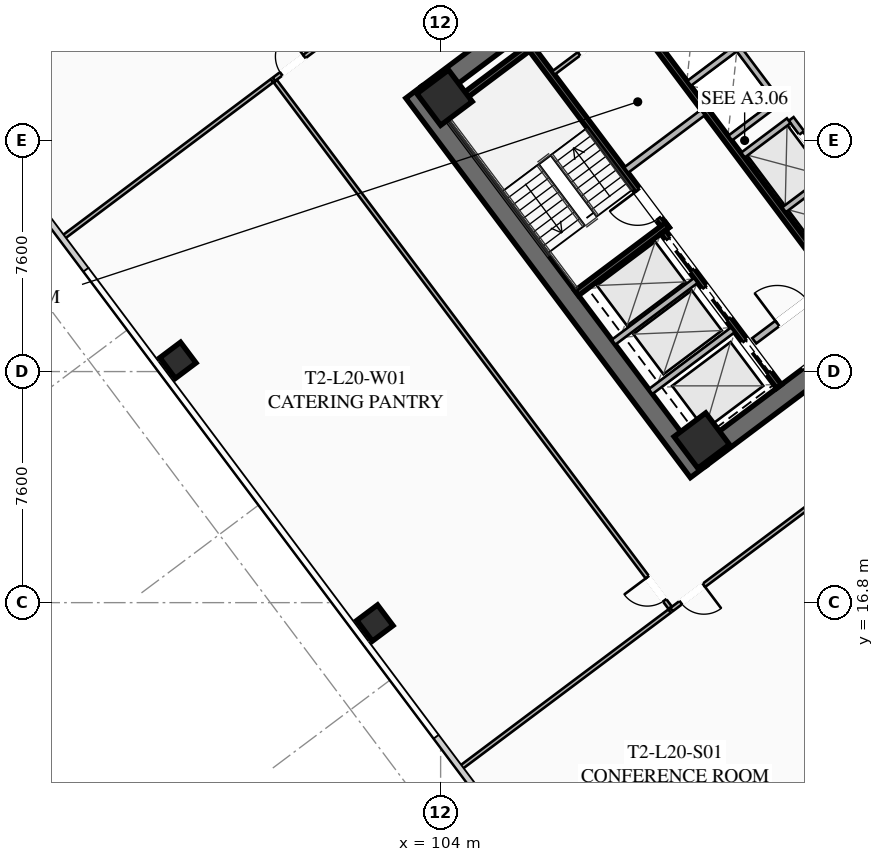
"""IFC4 building model, lengths in metres.
Left out: names, types, materials, properties, quantities, classifications, styles, units other than length and angle.
Written with IfcOpenShell. Run it as: python <this file> out.ifc"""

import sys

from ifc_helpers import new_model, si_unit, direction, frame, frame_2d, origin, origin_2d, place, context, subcontext, project, spatial, rectangle, hollow_rectangle, extrude, element, fill, save


model = new_model("IFC4")
c1 = context("Model", 3, precision=1e-05, world=origin(), true_north=direction((0.0, 1.0)))
c2 = subcontext(c1, "Body", "Model", "MODEL_VIEW")
j1 = project(units=[si_unit("LENGTHUNIT", "METRE"), si_unit("PLANEANGLEUNIT", "RADIAN")], contexts=[c1])
p1 = place(None, origin())
s1 = spatial("IfcSite", under=j1, at=p1, CompositionType="ELEMENT")
p2 = place(p1, origin())
s2 = spatial("IfcBuilding", under=s1, at=p2, CompositionType="ELEMENT")
p3 = place(p2, frame((0.0, 0.0, 77.85)))
s3 = spatial("IfcBuildingStorey", under=s2, at=p3, CompositionType="ELEMENT", Elevation=77.85)
for number, where, z_axis, x_axis in (
    (1, (112.476, 21.107, 0.0), (0.0, 0.0, 1.0), (-0.6, 0.8, 0.0)),
    (2, (115.524, 42.893, 0.0), (0.0, 0.0, 1.0), (0.6, -0.8, 0.0)),
):
    element("IfcWall", number, at=place(p3, frame(where, z_axis=z_axis, x_axis=x_axis)), inside=s3, PredefinedType="SHEAR", context=c2, shape_type="SweptSolid", body=[
        extrude(rectangle(XDim=15.6, YDim=0.65, at=frame_2d((7.8, 0.0))), origin(), (0.0, 0.0, 1.0), 3.55),
    ])
p4 = place(p3, frame((124.429, 30.478, 0.0), z_axis=(0.0, 0.0, 1.0), x_axis=(-0.799998028465, -0.600002628705, 0.0)))
e3 = element("IfcWall", 3, at=p4, inside=s3, PredefinedType="SHEAR", context=c2, shape_type="SweptSolid", body=[
    extrude(rectangle(XDim=14.86, YDim=0.65, at=frame_2d((7.43, 0.0))), origin(), (0.0, 0.0, 1.0), 3.55),
])
p5 = place(p4, frame((9.13, 0.0, 0.0)))
e4 = element("IfcOpeningElement", 4, at=p5, cuts=e3, PredefinedType="OPENING", context=c2, shape_type="SweptSolid", body=[
    extrude(rectangle(XDim=1.25, YDim=2.25, at=frame_2d((0.625, 1.125))), frame((0.0, 0.335, 0.0), z_axis=(0.0, -1.0, 0.0), x_axis=(1.0, 0.0, 0.0)), (0.0, 0.0, 1.0), 0.67),
])
p6 = place(p4, frame((4.08, 0.0, 0.0)))
e5 = element("IfcOpeningElement", 5, at=p6, cuts=e3, PredefinedType="OPENING", context=c2, shape_type="SweptSolid", body=[
    extrude(rectangle(XDim=1.25, YDim=2.25, at=frame_2d((0.625, 1.125))), frame((0.0, 0.335, 0.0), z_axis=(0.0, -1.0, 0.0), x_axis=(1.0, 0.0, 0.0)), (0.0, 0.0, 1.0), 0.67),
])
p7 = place(p3, frame((103.571, 33.522, 0.0), z_axis=(0.0, 0.0, 1.0), x_axis=(0.799998028465, 0.600002628705, 0.0)))
e6 = element("IfcWall", 6, at=p7, inside=s3, PredefinedType="SHEAR", context=c2, shape_type="SweptSolid", body=[
    extrude(rectangle(XDim=14.86, YDim=0.65, at=frame_2d((7.43, 0.0))), origin(), (0.0, 0.0, 1.0), 3.55),
])
p8 = place(p7, frame((4.48, 0.0, 0.0)))
e7 = element("IfcOpeningElement", 7, at=p8, cuts=e6, PredefinedType="OPENING", context=c2, shape_type="SweptSolid", body=[
    extrude(rectangle(XDim=1.25, YDim=2.25, at=frame_2d((0.625, 1.125))), frame((0.0, 0.335, 0.0), z_axis=(0.0, -1.0, 0.0), x_axis=(1.0, 0.0, 0.0)), (0.0, 0.0, 1.0), 0.67),
])
p9 = place(p7, frame((9.53, 0.0, 0.0)))
e8 = element("IfcOpeningElement", 8, at=p9, cuts=e6, PredefinedType="OPENING", context=c2, shape_type="SweptSolid", body=[
    extrude(rectangle(XDim=1.25, YDim=2.25, at=frame_2d((0.625, 1.125))), frame((0.0, 0.335, 0.0), z_axis=(0.0, -1.0, 0.0), x_axis=(1.0, 0.0, 0.0)), (0.0, 0.0, 1.0), 0.67),
])
for number, where, z_axis, x_axis in (
    (9, (112.59, 22.13, 0.0), (0.0, 0.0, 1.0), (0.8, 0.6, 0.0)),
    (10, (104.13, 33.41, 0.0), (0.0, 0.0, 1.0), (0.8, 0.6, 0.0)),
):
    element("IfcColumn", number, at=place(p3, frame(where, z_axis=z_axis, x_axis=x_axis)), inside=s3, PredefinedType="COLUMN", context=c2, shape_type="SweptSolid", body=[
        extrude(hollow_rectangle(XDim=1.3, YDim=1.3, WallThickness=0.05, at=origin_2d()), origin(), (0.0, 0.0, 1.0), 3.35),
    ])
for number, where, z_axis, x_axis in (
    (11, (95.36, 24.77, 0.0), (0.0, 0.0, 1.0), (0.8, 0.6, 0.0)),
    (12, (101.84, 16.13, 0.0), (0.0, 0.0, 1.0), (0.8, 0.6, 0.0)),
):
    element("IfcColumn", number, at=place(p3, frame(where, z_axis=z_axis, x_axis=x_axis)), inside=s3, PredefinedType="COLUMN", context=c2, shape_type="SweptSolid", body=[
        extrude(hollow_rectangle(XDim=0.85, YDim=0.85, WallThickness=0.035, at=origin_2d()), origin(), (0.0, 0.0, 1.0), 3.35),
    ])
p10 = place(p3, frame((111.44, 29.08, 0.0), z_axis=(0.0, 0.0, 1.0), x_axis=(-0.600009827119, 0.799992629566, 0.0)))
e13 = element("IfcWall", 13, at=p10, inside=s3, PredefinedType="SHEAR", context=c2, shape_type="SweptSolid", body=[
    extrude(rectangle(XDim=7.95, YDim=0.2, at=frame_2d((3.975, 0.0))), origin(), (0.0, 0.0, 1.0), 3.35),
])
p11 = place(p10, frame((0.45, 0.0, 0.0)))
e14 = element("IfcOpeningElement", 14, at=p11, cuts=e13, PredefinedType="OPENING", context=c2, shape_type="SweptSolid", body=[
    extrude(rectangle(XDim=1.15, YDim=2.2, at=frame_2d((0.575, 1.1))), frame((0.0, 0.11, 0.0), z_axis=(0.0, -1.0, 0.0), x_axis=(1.0, 0.0, 0.0)), (0.0, 0.0, 1.0), 0.22),
])
for number, where, z_axis, x_axis in (
    (15, (108.476, 26.982, 0.0), (0.0, 0.0, 1.0), (0.8, 0.6, 0.0)),
    (16, (104.036, 32.902, 0.0), (0.0, 0.0, 1.0), (0.8, 0.6, 0.0)),
):
    element("IfcWall", number, at=place(p3, frame(where, z_axis=z_axis, x_axis=x_axis)), inside=s3, PredefinedType="SHEAR", context=c2, shape_type="SweptSolid", body=[
        extrude(rectangle(XDim=3.73, YDim=0.2, at=frame_2d((1.865, 0.0))), origin(), (0.0, 0.0, 1.0), 3.35),
    ])
p12 = place(p3, frame((117.938, 26.016, 0.0), z_axis=(0.0, 0.0, 1.0), x_axis=(-0.600005463273, 0.799995902516, 0.0)))
e17 = element("IfcWall", 17, at=p12, inside=s3, PredefinedType="SHEAR", context=c2, shape_type="SweptSolid", body=[
    extrude(rectangle(XDim=14.3, YDim=0.2, at=frame_2d((7.15, 0.0))), origin(), (0.0, 0.0, 1.0), 3.35),
])
p13 = place(p3, frame((110.104, 31.028, 0.0), z_axis=(0.0, 0.0, 1.0), x_axis=(0.800018601094, 0.59997519774, 0.0)))
e18 = element("IfcWall", 18, at=p13, inside=s3, PredefinedType="SOLIDWALL", context=c2, shape_type="SweptSolid", body=[
    extrude(rectangle(XDim=3.15, YDim=0.22, at=frame_2d((1.575, 0.0))), origin(), (0.0, 0.0, 1.0), 2.703),
])
p14 = place(p3, frame((114.316, 25.412, 0.0), z_axis=(0.0, 0.0, 1.0), x_axis=(0.800018601094, 0.59997519774, 0.0)))
e19 = element("IfcWall", 19, at=p14, inside=s3, PredefinedType="SOLIDWALL", context=c2, shape_type="SweptSolid", body=[
    extrude(rectangle(XDim=3.15, YDim=0.22, at=frame_2d((1.575, 0.0))), origin(), (0.0, 0.0, 1.0), 2.703),
])
p15 = place(p14, frame((0.95, 0.0, 0.0)))
e20 = element("IfcOpeningElement", 20, at=p15, cuts=e19, PredefinedType="OPENING", context=c2, shape_type="SweptSolid", body=[
    extrude(rectangle(XDim=1.25, YDim=2.25, at=frame_2d((0.625, 1.125))), frame((0.0, 0.12, 0.0), z_axis=(0.0, -1.0, 0.0), x_axis=(1.0, 0.0, 0.0)), (0.0, 0.0, 1.0), 0.24),
])
p16 = place(p3, frame((115.13, 23.91, 0.0), z_axis=(0.0, 0.0, 1.0), x_axis=(-0.599975393228, 0.800018454488, 0.0)))
e21 = element("IfcWall", 21, at=p16, inside=s3, PredefinedType="SHEAR", context=c2, shape_type="SweptSolid", body=[
    extrude(rectangle(XDim=6.35, YDim=0.2, at=frame_2d((3.175, 0.0))), origin(), (0.0, 0.0, 1.0), 3.35),
])
p17 = place(p16, frame((4.775, 0.0, 0.0)))
e22 = element("IfcOpeningElement", 22, at=p17, cuts=e21, PredefinedType="OPENING", context=c2, shape_type="SweptSolid", body=[
    extrude(rectangle(XDim=1.3, YDim=2.25, at=frame_2d((0.65, 1.125))), frame((0.0, 0.11, 0.0), z_axis=(0.0, -1.0, 0.0), x_axis=(1.0, 0.0, 0.0)), (0.0, 0.0, 1.0), 0.22),
])
p18 = place(p16, frame((2.775, 0.0, 0.0)))
e23 = element("IfcOpeningElement", 23, at=p18, cuts=e21, PredefinedType="OPENING", context=c2, shape_type="SweptSolid", body=[
    extrude(rectangle(XDim=1.3, YDim=2.25, at=frame_2d((0.65, 1.125))), frame((0.0, 0.11, 0.0), z_axis=(0.0, -1.0, 0.0), x_axis=(1.0, 0.0, 0.0)), (0.0, 0.0, 1.0), 0.22),
])
p19 = place(p16, frame((0.575, 0.0, 0.0)))
e24 = element("IfcOpeningElement", 24, at=p19, cuts=e21, PredefinedType="OPENING", context=c2, shape_type="SweptSolid", body=[
    extrude(rectangle(XDim=1.3, YDim=2.25, at=frame_2d((0.65, 1.125))), frame((0.0, 0.11, 0.0), z_axis=(0.0, -1.0, 0.0), x_axis=(1.0, 0.0, 0.0)), (0.0, 0.0, 1.0), 0.22),
])
for number, where, z_axis, x_axis in (
    (25, (110.906, 23.742, 0.0), (0.0, 0.0, 1.0), (0.8, 0.6, 0.0)),
    (26, (109.688, 25.366, 0.0), (0.0, 0.0, 1.0), (0.8, 0.6, 0.0)),
):
    element("IfcWall", number, at=place(p3, frame(where, z_axis=z_axis, x_axis=x_axis)), inside=s3, PredefinedType="SOLIDWALL", context=c2, shape_type="SweptSolid", body=[
        extrude(rectangle(XDim=3.38, YDim=0.2, at=frame_2d((1.69, 0.0))), origin(), (0.0, 0.0, 1.0), 3.35),
    ])
p20 = place(p3, frame((107.71, 34.22, 0.0), z_axis=(0.0, 0.0, 1.0), x_axis=(0.799981399002, 0.60002480053, 0.0)))
e27 = element("IfcWall", 27, at=p20, inside=s3, PredefinedType="PARTITIONING", context=c2, shape_type="SweptSolid", body=[
    extrude(rectangle(XDim=3.15, YDim=0.135, at=frame_2d((1.575, 0.0))), origin(), (0.0, 0.0, 1.0), 2.703),
])
p21 = place(p20, frame((1.05, 0.0, 0.0)))
e28 = element("IfcOpeningElement", 28, at=p21, cuts=e27, PredefinedType="OPENING", context=c2, shape_type="SweptSolid", body=[
    extrude(rectangle(XDim=1.05, YDim=2.2, at=frame_2d((0.525, 1.1))), frame((0.0, 0.077, 0.0), z_axis=(0.0, -1.0, 0.0), x_axis=(1.0, 0.0, 0.0)), (0.0, 0.0, 1.0), 0.155),
])
p22 = place(p3, frame((119.61, 27.27, 0.0), z_axis=(0.0, 0.0, 1.0), x_axis=(-0.600011488909, 0.79999138319, 0.0)))
e29 = element("IfcWall", 29, at=p22, inside=s3, PredefinedType="SOLIDWALL", context=c2, shape_type="SweptSolid", body=[
    extrude(rectangle(XDim=6.8, YDim=0.2, at=frame_2d((3.4, 0.0))), origin(), (0.0, 0.0, 1.0), 3.35),
])
p23 = place(p22, frame((0.625, 0.0, 0.0)))
e30 = element("IfcOpeningElement", 30, at=p23, cuts=e29, PredefinedType="OPENING", context=c2, shape_type="SweptSolid", body=[
    extrude(rectangle(XDim=1.1, YDim=2.2, at=frame_2d((0.55, 1.1))), frame((0.0, 0.11, 0.0), z_axis=(0.0, -1.0, 0.0), x_axis=(1.0, 0.0, 0.0)), (0.0, 0.0, 1.0), 0.22),
])
p24 = place(p22, frame((2.875, 0.0, 0.0)))
e31 = element("IfcOpeningElement", 31, at=p24, cuts=e29, PredefinedType="OPENING", context=c2, shape_type="SweptSolid", body=[
    extrude(rectangle(XDim=1.1, YDim=2.2, at=frame_2d((0.55, 1.1))), frame((0.0, 0.11, 0.0), z_axis=(0.0, -1.0, 0.0), x_axis=(1.0, 0.0, 0.0)), (0.0, 0.0, 1.0), 0.22),
])
p25 = place(p22, frame((5.125, 0.0, 0.0)))
e32 = element("IfcOpeningElement", 32, at=p25, cuts=e29, PredefinedType="OPENING", context=c2, shape_type="SweptSolid", body=[
    extrude(rectangle(XDim=1.1, YDim=2.2, at=frame_2d((0.55, 1.1))), frame((0.0, 0.11, 0.0), z_axis=(0.0, -1.0, 0.0), x_axis=(1.0, 0.0, 0.0)), (0.0, 0.0, 1.0), 0.22),
])
p26 = place(p3, frame((115.296, 29.722, 0.0), z_axis=(0.0, 0.0, 1.0), x_axis=(0.799984418148, 0.600020775241, 0.0)))
e33 = element("IfcWall", 33, at=p26, inside=s3, PredefinedType="SOLIDWALL", context=c2, shape_type="SweptSolid", body=[
    extrude(rectangle(XDim=1.88, YDim=0.2, at=frame_2d((0.94, 0.0))), origin(), (0.0, 0.0, 1.0), 3.35),
])
p27 = place(p3, frame((113.946, 31.522, 0.0), z_axis=(0.0, 0.0, 1.0), x_axis=(0.8, 0.6, 0.0)))
e34 = element("IfcWall", 34, at=p27, inside=s3, PredefinedType="SOLIDWALL", context=c2, shape_type="SweptSolid", body=[
    extrude(rectangle(XDim=1.88, YDim=0.2, at=frame_2d((0.94, 0.0))), origin(), (0.0, 0.0, 1.0), 3.35),
])
p28 = place(p3, frame((115.11, 33.27, 0.0), z_axis=(0.0, 0.0, 1.0), x_axis=(-0.600011488909, 0.79999138319, 0.0)))
e35 = element("IfcWall", 35, at=p28, inside=s3, PredefinedType="SOLIDWALL", context=c2, shape_type="SweptSolid", body=[
    extrude(rectangle(XDim=6.8, YDim=0.2, at=frame_2d((3.4, 0.0))), origin(), (0.0, 0.0, 1.0), 3.35),
])
p29 = place(p3, frame((113.526, 32.082, 0.0), z_axis=(0.0, 0.0, 1.0), x_axis=(0.800046745961, 0.599937666993, 0.0)))
e36 = element("IfcWall", 36, at=p29, inside=s3, PredefinedType="SOLIDWALL", context=c2, shape_type="SweptSolid", body=[
    extrude(rectangle(XDim=1.88, YDim=0.2, at=frame_2d((0.94, 0.0))), origin(), (0.0, 0.0, 1.0), 3.35),
])
p30 = place(p3, frame((112.176, 33.882, 0.0), z_axis=(0.0, 0.0, 1.0), x_axis=(0.8, 0.6, 0.0)))
e37 = element("IfcWall", 37, at=p30, inside=s3, PredefinedType="SOLIDWALL", context=c2, shape_type="SweptSolid", body=[
    extrude(rectangle(XDim=1.88, YDim=0.2, at=frame_2d((0.94, 0.0))), origin(), (0.0, 0.0, 1.0), 3.35),
])
p31 = place(p3, frame((98.516, 34.012, 0.0), z_axis=(0.0, 0.0, 1.0), x_axis=(0.8, 0.6, 0.0)))
e38 = element("IfcWall", 38, at=p31, inside=s3, PredefinedType="PARTITIONING", context=c2, shape_type="SweptSolid", body=[
    extrude(rectangle(XDim=28.23, YDim=0.135, at=frame_2d((14.115, 0.0))), origin(), (0.0, 0.0, 1.0), 2.703),
])
p32 = place(p31, frame((0.3, 0.0, 0.0)))
e39 = element("IfcOpeningElement", 39, at=p32, cuts=e38, PredefinedType="OPENING", context=c2, shape_type="SweptSolid", body=[
    extrude(rectangle(XDim=0.95, YDim=2.05, at=frame_2d((0.475, 1.025))), frame((0.0, 0.077, 0.0), z_axis=(0.0, -1.0, 0.0), x_axis=(1.0, 0.0, 0.0)), (0.0, 0.0, 1.0), 0.155),
])
p33 = place(p31, frame((11.004, 0.0, 0.0)))
e40 = element("IfcOpeningElement", 40, at=p33, cuts=e38, PredefinedType="OPENING", context=c2, shape_type="SweptSolid", body=[
    extrude(rectangle(XDim=0.95, YDim=2.05, at=frame_2d((0.475, 1.025))), frame((0.0, 0.077, 0.0), z_axis=(0.0, -1.0, 0.0), x_axis=(1.0, 0.0, 0.0)), (0.0, 0.0, 1.0), 0.155),
])
p34 = place(p31, frame((26.98, 0.0, 0.0)))
e41 = element("IfcOpeningElement", 41, at=p34, cuts=e38, PredefinedType="OPENING", context=c2, shape_type="SweptSolid", body=[
    extrude(rectangle(XDim=0.95, YDim=2.05, at=frame_2d((0.475, 1.025))), frame((0.0, 0.077, 0.0), z_axis=(0.0, -1.0, 0.0), x_axis=(1.0, 0.0, 0.0)), (0.0, 0.0, 1.0), 0.155),
])
p35 = place(p3, frame((134.18, 33.51, 0.0), z_axis=(0.0, 0.0, 1.0), x_axis=(-0.8, -0.6, 0.0)))
e42 = element("IfcWall", 42, at=p35, inside=s3, PredefinedType="PARTITIONING", context=c2, shape_type="SweptSolid", body=[
    extrude(rectangle(XDim=28.23, YDim=0.135, at=frame_2d((14.115, 0.0))), origin(), (0.0, 0.0, 1.0), 2.703),
])
p36 = place(p35, frame((26.9, 0.0, 0.0)))
e43 = element("IfcOpeningElement", 43, at=p36, cuts=e42, PredefinedType="OPENING", context=c2, shape_type="SweptSolid", body=[
    extrude(rectangle(XDim=0.95, YDim=2.05, at=frame_2d((0.475, 1.025))), frame((0.0, 0.077, 0.0), z_axis=(0.0, -1.0, 0.0), x_axis=(1.0, 0.0, 0.0)), (0.0, 0.0, 1.0), 0.155),
])
p37 = place(p35, frame((16.453, 0.0, 0.0)))
e44 = element("IfcOpeningElement", 44, at=p37, cuts=e42, PredefinedType="OPENING", context=c2, shape_type="SweptSolid", body=[
    extrude(rectangle(XDim=0.95, YDim=2.05, at=frame_2d((0.475, 1.025))), frame((0.0, 0.077, 0.0), z_axis=(0.0, -1.0, 0.0), x_axis=(1.0, 0.0, 0.0)), (0.0, 0.0, 1.0), 0.155),
])
p38 = place(p35, frame((0.38, 0.0, 0.0)))
e45 = element("IfcOpeningElement", 45, at=p38, cuts=e42, PredefinedType="OPENING", context=c2, shape_type="SweptSolid", body=[
    extrude(rectangle(XDim=0.95, YDim=2.05, at=frame_2d((0.475, 1.025))), frame((0.0, 0.077, 0.0), z_axis=(0.0, -1.0, 0.0), x_axis=(1.0, 0.0, 0.0)), (0.0, 0.0, 1.0), 0.155),
])
p39 = place(p3, frame((111.548, 16.636, 0.0), z_axis=(0.0, 0.0, 1.0), x_axis=(-0.600003610192, 0.799997292343, 0.0)))
e46 = element("IfcWall", 46, at=p39, inside=s3, PredefinedType="PARTITIONING", context=c2, shape_type="SweptSolid", body=[
    extrude(rectangle(XDim=21.64, YDim=0.135, at=frame_2d((10.82, 0.0))), origin(), (0.0, 0.0, 1.0), 2.703),
])
p40 = place(p39, frame((0.3, 0.0, 0.0)))
e47 = element("IfcOpeningElement", 47, at=p40, cuts=e46, PredefinedType="OPENING", context=c2, shape_type="SweptSolid", body=[
    extrude(rectangle(XDim=0.95, YDim=2.05, at=frame_2d((0.475, 1.025))), frame((0.0, 0.077, 0.0), z_axis=(0.0, -1.0, 0.0), x_axis=(1.0, 0.0, 0.0)), (0.0, 0.0, 1.0), 0.155),
])
p41 = place(p3, frame((98.452, 33.964, 0.0), z_axis=(0.0, 0.0, 1.0), x_axis=(-0.799993202584, -0.600009063115, 0.0)))
e48 = element("IfcWall", 48, at=p41, inside=s3, PredefinedType="PARTITIONING", context=c2, shape_type="SweptSolid", body=[
    extrude(rectangle(XDim=8.62, YDim=0.135, at=frame_2d((4.31, 0.0))), origin(), (0.0, 0.0, 1.0), 2.703),
])
p42 = place(p3, frame((104.636, 11.352, 0.0), z_axis=(0.0, 0.0, 1.0), x_axis=(0.800006797429, 0.599990936654, 0.0)))
e49 = element("IfcWall", 49, at=p42, inside=s3, PredefinedType="PARTITIONING", context=c2, shape_type="SweptSolid", body=[
    extrude(rectangle(XDim=8.62, YDim=0.135, at=frame_2d((4.31, 0.0))), origin(), (0.0, 0.0, 1.0), 2.703),
])
p43 = place(p11, origin())
e50 = element("IfcDoor", 50, at=p43, inside=s3, OperationType="SINGLE_SWING_RIGHT", PredefinedType="DOOR", context=c2, shape_type="SweptSolid", body=[
    extrude(rectangle(XDim=1.15, YDim=2.2, at=frame_2d((0.575, 1.1))), frame((0.0, 0.025, 0.0), z_axis=(0.0, -1.0, 0.0), x_axis=(1.0, 0.0, 0.0)), (0.0, 0.0, 1.0), 0.05),
])
fill(e14, e50)
p44 = place(p15, origin())
e51 = element("IfcDoor", 51, at=p44, inside=s3, OperationType="SINGLE_SWING_LEFT", PredefinedType="DOOR", context=c2, shape_type="SweptSolid", body=[
    extrude(rectangle(XDim=1.25, YDim=2.25, at=frame_2d((0.625, 1.125))), frame((0.0, 0.025, 0.0), z_axis=(0.0, -1.0, 0.0), x_axis=(1.0, 0.0, 0.0)), (0.0, 0.0, 1.0), 0.05),
])
fill(e20, e51)
p45 = place(p21, origin())
e52 = element("IfcDoor", 52, at=p45, inside=s3, OperationType="SINGLE_SWING_LEFT", PredefinedType="DOOR", context=c2, shape_type="SweptSolid", body=[
    extrude(rectangle(XDim=1.05, YDim=2.2, at=frame_2d((0.525, 1.1))), frame((0.0, 0.025, 0.0), z_axis=(0.0, -1.0, 0.0), x_axis=(1.0, 0.0, 0.0)), (0.0, 0.0, 1.0), 0.05),
])
fill(e28, e52)
p46 = place(p32, origin())
e53 = element("IfcDoor", 53, at=p46, inside=s3, OperationType="SINGLE_SWING_RIGHT", PredefinedType="DOOR", context=c2, shape_type="SweptSolid", body=[
    extrude(rectangle(XDim=0.95, YDim=2.05, at=frame_2d((0.475, 1.025))), frame((0.0, 0.025, 0.0), z_axis=(0.0, -1.0, 0.0), x_axis=(1.0, 0.0, 0.0)), (0.0, 0.0, 1.0), 0.05),
])
fill(e39, e53)
p47 = place(p36, origin())
e54 = element("IfcDoor", 54, at=p47, inside=s3, OperationType="SINGLE_SWING_LEFT", PredefinedType="DOOR", context=c2, shape_type="SweptSolid", body=[
    extrude(rectangle(XDim=0.95, YDim=2.05, at=frame_2d((0.475, 1.025))), frame((0.0, 0.025, 0.0), z_axis=(0.0, -1.0, 0.0), x_axis=(1.0, 0.0, 0.0)), (0.0, 0.0, 1.0), 0.05),
])
fill(e43, e54)
p48 = place(p40, origin())
e55 = element("IfcDoor", 55, at=p48, inside=s3, OperationType="SINGLE_SWING_RIGHT", PredefinedType="DOOR", context=c2, shape_type="SweptSolid", body=[
    extrude(rectangle(XDim=0.95, YDim=2.05, at=frame_2d((0.475, 1.025))), frame((0.0, 0.025, 0.0), z_axis=(0.0, -1.0, 0.0), x_axis=(1.0, 0.0, 0.0)), (0.0, 0.0, 1.0), 0.05),
])
fill(e47, e55)
p49 = place(p17, origin())
e56 = element("IfcDoor", 56, at=p49, inside=s3, OperationType="SLIDING_TO_LEFT", PredefinedType="DOOR", context=c2, shape_type="SweptSolid", body=[
    extrude(rectangle(XDim=1.3, YDim=2.25, at=frame_2d((0.65, 1.125))), frame((0.0, 0.025, 0.0), z_axis=(0.0, -1.0, 0.0), x_axis=(1.0, 0.0, 0.0)), (0.0, 0.0, 1.0), 0.05),
])
fill(e22, e56)
p50 = place(p18, origin())
e57 = element("IfcDoor", 57, at=p50, inside=s3, OperationType="SLIDING_TO_LEFT", PredefinedType="DOOR", context=c2, shape_type="SweptSolid", body=[
    extrude(rectangle(XDim=1.3, YDim=2.25, at=frame_2d((0.65, 1.125))), frame((0.0, 0.025, 0.0), z_axis=(0.0, -1.0, 0.0), x_axis=(1.0, 0.0, 0.0)), (0.0, 0.0, 1.0), 0.05),
])
fill(e23, e57)
p51 = place(p19, origin())
e58 = element("IfcDoor", 58, at=p51, inside=s3, OperationType="SLIDING_TO_LEFT", PredefinedType="DOOR", context=c2, shape_type="SweptSolid", body=[
    extrude(rectangle(XDim=1.3, YDim=2.25, at=frame_2d((0.65, 1.125))), frame((0.0, 0.025, 0.0), z_axis=(0.0, -1.0, 0.0), x_axis=(1.0, 0.0, 0.0)), (0.0, 0.0, 1.0), 0.05),
])
fill(e24, e58)
p52 = place(p25, origin())
e59 = element("IfcDoor", 59, at=p52, inside=s3, OperationType="SLIDING_TO_LEFT", PredefinedType="DOOR", context=c2, shape_type="SweptSolid", body=[
    extrude(rectangle(XDim=1.1, YDim=2.2, at=frame_2d((0.55, 1.1))), frame((0.0, 0.025, 0.0), z_axis=(0.0, -1.0, 0.0), x_axis=(1.0, 0.0, 0.0)), (0.0, 0.0, 1.0), 0.05),
])
fill(e32, e59)
save(model, sys.argv[1])
